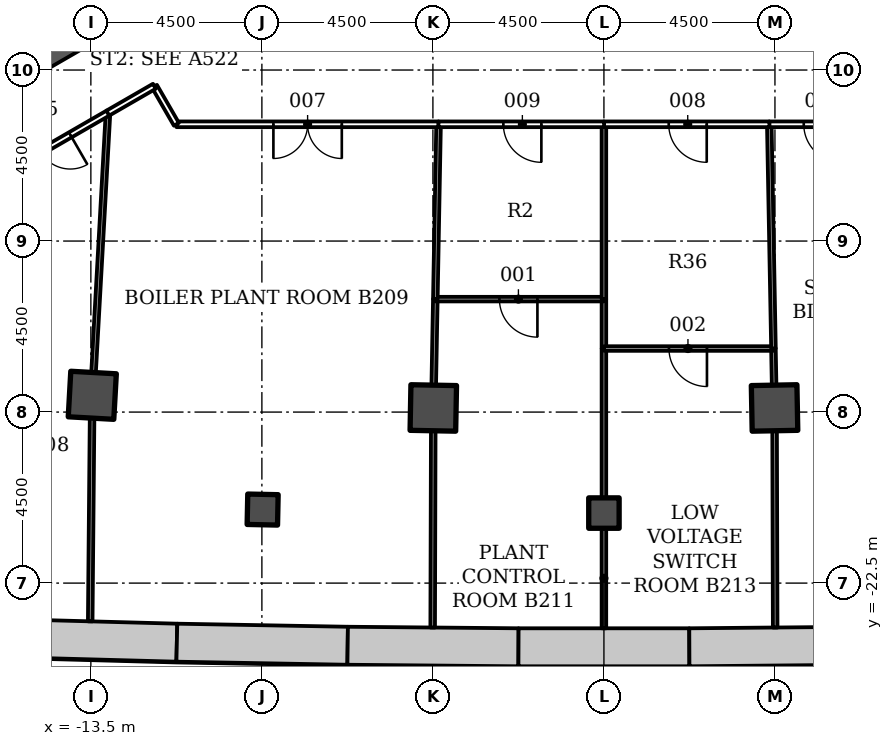
"""IFC4 building model, lengths in metres.
Left out: names, types, materials, properties, quantities, classifications, styles, units other than length and angle.
Written with IfcOpenShell. Run it as: python <this file> out.ifc"""

import sys

from ifc_helpers import new_model, si_unit, direction, frame, frame_2d, origin, origin_2d, place, context, subcontext, project, spatial, polyline, rectangle, outline, extrude, element, fill, save


model = new_model("IFC4")
c1 = context("Model", 3, precision=1e-05, world=origin(), true_north=direction((0.0, 1.0)))
c2 = subcontext(c1, "Body", "Model", "MODEL_VIEW")
j1 = project(units=[si_unit("LENGTHUNIT", "METRE"), si_unit("PLANEANGLEUNIT", "RADIAN")], contexts=[c1])
p1 = place(None, origin())
s1 = spatial("IfcSite", under=j1, at=p1, CompositionType="ELEMENT")
p2 = place(p1, origin())
s2 = spatial("IfcBuilding", under=s1, at=p2, CompositionType="ELEMENT")
p3 = place(p2, frame((0.0, 0.0, -9.0)))
s3 = spatial("IfcBuildingStorey", under=s2, at=p3, CompositionType="ELEMENT", Elevation=-9.0)
p4 = place(p3, origin())
e1 = element("IfcWall", 1, at=p4, inside=s3, PredefinedType="SOLIDWALL", context=c2, shape_type="SweptSolid", body=[
    extrude(outline(polyline([(-15.747, -24.446), (-11.249, -24.568), (-11.227, -23.568), (-15.716, -23.447), (-15.747, -24.446)])), origin(), (0.0, 0.0, 1.0), 4.2),
])
p5 = place(p3, origin())
e2 = element("IfcWall", 2, at=p5, inside=s3, PredefinedType="SOLIDWALL", context=c2, shape_type="SweptSolid", body=[
    extrude(outline(polyline([(-11.249, -24.568), (-6.75, -24.648), (-6.736, -23.649), (-11.227, -23.568), (-11.249, -24.568)])), origin(), (0.0, 0.0, 1.0), 4.2),
])
p6 = place(p3, origin())
e3 = element("IfcWall", 3, at=p6, inside=s3, PredefinedType="SOLIDWALL", context=c2, shape_type="SweptSolid", body=[
    extrude(outline(polyline([(-6.75, -24.648), (-2.25, -24.689), (-2.246, -23.689), (-6.736, -23.649), (-6.75, -24.648)])), origin(), (0.0, 0.0, 1.0), 4.2),
])
p7 = place(p3, origin())
e4 = element("IfcWall", 4, at=p7, inside=s3, PredefinedType="SOLIDWALL", context=c2, shape_type="SweptSolid", body=[
    extrude(outline(polyline([(-2.25, -24.689), (2.25, -24.689), (2.246, -23.689), (-2.246, -23.689), (-2.25, -24.689)])), origin(), (0.0, 0.0, 1.0), 4.2),
])
p8 = place(p3, origin())
e5 = element("IfcWall", 5, at=p8, inside=s3, PredefinedType="SOLIDWALL", context=c2, shape_type="SweptSolid", body=[
    extrude(outline(polyline([(2.25, -24.689), (6.75, -24.648), (6.736, -23.649), (2.246, -23.689), (2.25, -24.689)])), origin(), (0.0, 0.0, 1.0), 4.2),
])
for number, where, z_axis, x_axis in (
    (6, (-13.462, -17.558, -0.3), (0.0, 0.0, 1.0), (-0.056, -0.998, 0.0)),
    (7, (-4.49, -17.892, -0.3), (0.0, 0.0, 1.0), (-0.019, -1.0, 0.0)),
    (8, (4.49, -17.892, -0.3), (0.0, 0.0, 1.0), (0.019, -1.0, 0.0)),
):
    element("IfcColumn", number, at=place(p3, frame(where, z_axis=z_axis, x_axis=x_axis)), inside=s3, PredefinedType="COLUMN", context=c2, shape_type="SweptSolid", body=[
        extrude(rectangle(XDim=1.2, YDim=1.2, at=origin_2d()), origin(), (0.0, 0.0, 1.0), 4.5),
    ])
for number, where, z_axis, x_axis in (
    (9, (-8.98, -20.565, -0.3), (0.0, 0.0, 1.0), (-0.021, -1.0, 0.0)),
    (10, (0.0, -20.657, -0.3), (0.0, 0.0, 1.0), (0.0, -1.0, 0.0)),
):
    element("IfcColumn", number, at=place(p3, frame(where, z_axis=z_axis, x_axis=x_axis)), inside=s3, PredefinedType="COLUMN", context=c2, shape_type="SweptSolid", body=[
        extrude(rectangle(XDim=0.8, YDim=0.8, at=origin_2d()), origin(), (0.0, 0.0, 1.0), 4.5),
    ])
p9 = place(p3, frame((-9.922, -5.728, -0.3), z_axis=(0.0, 0.0, 1.0), x_axis=(-0.866028046028, -0.499995423472, 0.0)))
e11 = element("IfcWall", 11, at=p9, inside=s3, PredefinedType="SHEAR", context=c2, shape_type="SweptSolid", body=[
    extrude(rectangle(XDim=14.633, YDim=0.9, at=frame_2d((7.316, 0.0))), origin(), (0.0, 0.0, 1.0), 4.5),
])
p10 = place(p9, frame((7.35, 0.0, 0.3)))
e12 = element("IfcOpeningElement", 12, at=p10, cuts=e11, PredefinedType="OPENING", context=c2, shape_type="SweptSolid", body=[
    extrude(rectangle(XDim=1.5, YDim=2.1, at=frame_2d((0.75, 1.05))), frame((0.0, 0.46, 0.0), z_axis=(0.0, -1.0, 0.0), x_axis=(1.0, 0.0, 0.0)), (0.0, 0.0, 1.0), 0.92),
])
p11 = place(p3, frame((-10.43, -4.847, -0.3), z_axis=(0.0, 0.0, 1.0), x_axis=(-0.866018442252, -0.500012057535, 0.0)))
e13 = element("IfcWall", 13, at=p11, inside=s3, PredefinedType="SHEAR", context=c2, shape_type="SweptSolid", body=[
    extrude(rectangle(XDim=7.2, YDim=1.136, at=frame_2d((3.6, 0.0))), origin(), (0.0, 0.0, 1.0), 4.5),
])
p12 = place(p3, frame((0.0, -23.689, 0.0), z_axis=(0.0, 0.0, 1.0), x_axis=(0.0, 1.0, 0.0)))
e14 = element("IfcWall", 14, at=p12, inside=s3, PredefinedType="PARTITIONING", context=c2, shape_type="SweptSolid", body=[
    extrude(rectangle(XDim=2.632, YDim=0.12, at=frame_2d((1.316, 0.0))), origin(), (0.0, 0.0, 1.0), 4.2),
])
p13 = place(p3, frame((0.0, -20.257, 0.0), z_axis=(0.0, 0.0, 1.0), x_axis=(0.0, 1.0, 0.0)))
e15 = element("IfcWall", 15, at=p13, inside=s3, PredefinedType="PARTITIONING", context=c2, shape_type="SweptSolid", body=[
    extrude(rectangle(XDim=3.929, YDim=0.12, at=frame_2d((1.965, 0.0))), origin(), (0.0, 0.0, 1.0), 3.588),
])
p14 = place(p3, frame((-4.491, -18.492, 0.0), z_axis=(0.0, 0.0, 1.0), x_axis=(-0.00292382622, -0.999995725611, 0.0)))
e16 = element("IfcWall", 16, at=p14, inside=s3, PredefinedType="PARTITIONING", context=c2, shape_type="SweptSolid", body=[
    extrude(rectangle(XDim=5.177, YDim=0.12, at=frame_2d((2.588, 0.0))), origin(), (0.0, 0.0, 1.0), 3.583),
])
p15 = place(p3, frame((-4.436, -15.024, 0.0), z_axis=(0.0, 0.0, 1.0), x_axis=(-0.018519330436, -0.999828502494, 0.0)))
e17 = element("IfcWall", 17, at=p15, inside=s3, PredefinedType="PARTITIONING", context=c2, shape_type="SweptSolid", body=[
    extrude(rectangle(XDim=2.268, YDim=0.12, at=frame_2d((1.134, 0.0))), origin(), (0.0, 0.0, 1.0), 3.588),
])
p16 = place(p3, frame((0.0, -16.328, 0.0), z_axis=(0.0, 0.0, 1.0), x_axis=(0.0, 1.0, 0.0)))
e18 = element("IfcWall", 18, at=p16, inside=s3, PredefinedType="PARTITIONING", context=c2, shape_type="SweptSolid", body=[
    extrude(rectangle(XDim=1.304, YDim=0.12, at=frame_2d((0.652, 0.0))), origin(), (0.0, 0.0, 1.0), 3.588),
])
p17 = place(p3, frame((0.0, -15.028, 0.0), z_axis=(0.0, 0.0, 1.0), x_axis=(-1.0, 0.0, 0.0)))
e19 = element("IfcWall", 19, at=p17, inside=s3, PredefinedType="PARTITIONING", context=c2, shape_type="SweptSolid", body=[
    extrude(rectangle(XDim=4.436, YDim=0.12, at=frame_2d((2.218, 0.0))), origin(), (0.0, 0.0, 1.0), 3.588),
])
p18 = place(p17, frame((1.75, 0.0, 0.0)))
e20 = element("IfcOpeningElement", 20, at=p18, cuts=e19, PredefinedType="OPENING", context=c2, shape_type="SweptSolid", body=[
    extrude(rectangle(XDim=1.0, YDim=2.1, at=frame_2d((0.5, 1.05))), frame((0.0, 0.07, 0.0), z_axis=(0.0, -1.0, 0.0), x_axis=(1.0, 0.0, 0.0)), (0.0, 0.0, 1.0), 0.14),
])
p19 = place(p3, frame((4.478, -17.291, 0.0), z_axis=(0.0, 0.0, 1.0), x_axis=(-0.018678891577, 0.999825534286, 0.0)))
e21 = element("IfcWall", 21, at=p19, inside=s3, PredefinedType="PARTITIONING", context=c2, shape_type="SweptSolid", body=[
    extrude(rectangle(XDim=0.967, YDim=0.12, at=frame_2d((0.484, 0.0))), origin(), (0.0, 0.0, 1.0), 3.588),
])
p20 = place(p3, frame((4.506, -23.669, 0.0), z_axis=(0.0, 0.0, 1.0), x_axis=(-0.00292382622, 0.999995725611, 0.0)))
e22 = element("IfcWall", 22, at=p20, inside=s3, PredefinedType="PARTITIONING", context=c2, shape_type="SweptSolid", body=[
    extrude(rectangle(XDim=5.177, YDim=0.12, at=frame_2d((2.588, 0.0))), origin(), (0.0, 0.0, 1.0), 3.583),
])
p21 = place(p3, frame((4.461, -16.328, 0.0), z_axis=(0.0, 0.0, 1.0), x_axis=(-1.0, 0.0, 0.0)))
e23 = element("IfcWall", 23, at=p21, inside=s3, PredefinedType="PARTITIONING", context=c2, shape_type="SweptSolid", body=[
    extrude(rectangle(XDim=4.461, YDim=0.12, at=frame_2d((2.23, 0.0))), origin(), (0.0, 0.0, 1.0), 3.588),
])
p22 = place(p21, frame((1.75, 0.0, 0.0)))
e24 = element("IfcOpeningElement", 24, at=p22, cuts=e23, PredefinedType="OPENING", context=c2, shape_type="SweptSolid", body=[
    extrude(rectangle(XDim=1.0, YDim=2.1, at=frame_2d((0.5, 1.05))), frame((0.0, 0.07, 0.0), z_axis=(0.0, -1.0, 0.0), x_axis=(1.0, 0.0, 0.0)), (0.0, 0.0, 1.0), 0.14),
])
p23 = place(p3, frame((-13.517, -23.506, 0.0), z_axis=(0.0, 0.0, 1.0), x_axis=(0.00917685765, 0.999957891755, 0.0)))
e25 = element("IfcWall", 25, at=p23, inside=s3, PredefinedType="PARTITIONING", context=c2, shape_type="SweptSolid", body=[
    extrude(rectangle(XDim=5.347, YDim=0.12, at=frame_2d((2.674, 0.0))), origin(), (0.0, 0.0, 1.0), 3.583),
])
p24 = place(p3, frame((-13.429, -16.96, 0.0), z_axis=(0.0, 0.0, 1.0), x_axis=(0.055551088657, 0.998455846069, 0.0)))
e26 = element("IfcWall", 26, at=p24, inside=s3, PredefinedType="PARTITIONING", context=c2, shape_type="SweptSolid", body=[
    extrude(rectangle(XDim=6.838, YDim=0.12, at=frame_2d((3.419, 0.0))), origin(), (0.0, 0.0, 1.0), 3.588),
])
p25 = place(p3, frame((-13.045, -10.13, 0.0), z_axis=(0.0, 0.0, 1.0), x_axis=(-0.866035577775, -0.499982377718, 0.0)))
e27 = element("IfcWall", 27, at=p25, inside=s3, PredefinedType="PARTITIONING", context=c2, shape_type="SweptSolid", body=[
    extrude(rectangle(XDim=4.093, YDim=0.15, at=frame_2d((2.046, 0.0))), origin(), (0.0, 0.0, 1.0), 3.588),
])
p26 = place(p25, frame((1.15, 0.0, 0.0)))
e28 = element("IfcOpeningElement", 28, at=p26, cuts=e27, PredefinedType="OPENING", context=c2, shape_type="SweptSolid", body=[
    extrude(rectangle(XDim=1.8, YDim=2.1, at=frame_2d((0.9, 1.05))), frame((0.0, 0.085, 0.0), z_axis=(0.0, -1.0, 0.0), x_axis=(1.0, 0.0, 0.0)), (0.0, 0.0, 1.0), 0.17),
])
p27 = place(p3, frame((4.351, -10.429, 0.0), z_axis=(0.0, 0.0, 1.0), x_axis=(0.018624139004, -0.999826555682, 0.0)))
e29 = element("IfcWall", 29, at=p27, inside=s3, PredefinedType="PARTITIONING", context=c2, shape_type="SweptSolid", body=[
    extrude(rectangle(XDim=5.899, YDim=0.12, at=frame_2d((2.949, 0.0))), origin(), (0.0, 0.0, 1.0), 3.588),
])
p28 = place(p3, frame((7.208, -10.428, 0.0), z_axis=(0.0, 0.0, 1.0), x_axis=(-1.0, 0.0, 0.0)))
e30 = element("IfcWall", 30, at=p28, inside=s3, PredefinedType="PARTITIONING", context=c2, shape_type="SweptSolid", body=[
    extrude(rectangle(XDim=2.861, YDim=0.15, at=frame_2d((1.431, 0.0))), origin(), (0.0, 0.0, 1.0), 3.588),
])
p29 = place(p28, frame((0.95, 0.0, 0.0)))
e31 = element("IfcOpeningElement", 31, at=p29, cuts=e30, PredefinedType="OPENING", context=c2, shape_type="SweptSolid", body=[
    extrude(rectangle(XDim=1.0, YDim=2.1, at=frame_2d((0.5, 1.05))), frame((0.0, 0.085, 0.0), z_axis=(0.0, -1.0, 0.0), x_axis=(1.0, 0.0, 0.0)), (0.0, 0.0, 1.0), 0.17),
])
p30 = place(p3, frame((-4.436, -15.027, 0.0), z_axis=(0.0, 0.0, 1.0), x_axis=(0.018474068719, 0.99982933983, 0.0)))
e32 = element("IfcWall", 32, at=p30, inside=s3, PredefinedType="PARTITIONING", context=c2, shape_type="SweptSolid", body=[
    extrude(rectangle(XDim=4.599, YDim=0.12, at=frame_2d((2.299, 0.0))), origin(), (0.0, 0.0, 1.0), 3.588),
])
p31 = place(p3, frame((-4.347, -10.428, 0.0), z_axis=(0.0, 0.0, 1.0), x_axis=(-1.0, 0.0, 0.0)))
e33 = element("IfcWall", 33, at=p31, inside=s3, PredefinedType="PARTITIONING", context=c2, shape_type="SweptSolid", body=[
    extrude(rectangle(XDim=6.902, YDim=0.15, at=frame_2d((3.451, 0.0))), origin(), (0.0, 0.0, 1.0), 3.588),
])
p32 = place(p31, frame((2.55, 0.0, 0.0)))
e34 = element("IfcOpeningElement", 34, at=p32, cuts=e33, PredefinedType="OPENING", context=c2, shape_type="SweptSolid", body=[
    extrude(rectangle(XDim=1.8, YDim=2.1, at=frame_2d((0.9, 1.05))), frame((0.0, 0.085, 0.0), z_axis=(0.0, -1.0, 0.0), x_axis=(1.0, 0.0, 0.0)), (0.0, 0.0, 1.0), 0.17),
])
p33 = place(p3, frame((-11.249, -10.428, 0.0), z_axis=(0.0, 0.0, 1.0), x_axis=(-0.499978438088, 0.866037852202, 0.0)))
e35 = element("IfcWall", 35, at=p33, inside=s3, PredefinedType="PARTITIONING", context=c2, shape_type="SweptSolid", body=[
    extrude(rectangle(XDim=1.156, YDim=0.15, at=frame_2d((0.578, 0.0))), origin(), (0.0, 0.0, 1.0), 4.2),
])
p34 = place(p3, frame((-11.828, -9.427, 0.0), z_axis=(0.0, 0.0, 1.0), x_axis=(-0.866110865696, -0.499851946404, 0.0)))
e36 = element("IfcWall", 36, at=p34, inside=s3, PredefinedType="PARTITIONING", context=c2, shape_type="SweptSolid", body=[
    extrude(rectangle(XDim=1.415, YDim=0.15, at=frame_2d((0.707, 0.0))), origin(), (0.0, 0.0, 1.0), 3.588),
])
p35 = place(p3, frame((0.0, -10.428, 0.0), z_axis=(0.0, 0.0, 1.0), x_axis=(0.0, -1.0, 0.0)))
e37 = element("IfcWall", 37, at=p35, inside=s3, PredefinedType="PARTITIONING", context=c2, shape_type="SweptSolid", body=[
    extrude(rectangle(XDim=4.6, YDim=0.12, at=frame_2d((2.3, 0.0))), origin(), (0.0, 0.0, 1.0), 3.588),
])
p36 = place(p3, frame((4.355, -10.428, 0.0), z_axis=(0.0, 0.0, 1.0), x_axis=(-1.0, 0.0, 0.0)))
e38 = element("IfcWall", 38, at=p36, inside=s3, PredefinedType="PARTITIONING", context=c2, shape_type="SweptSolid", body=[
    extrude(rectangle(XDim=4.359, YDim=0.15, at=frame_2d((2.179, 0.0))), origin(), (0.0, 0.0, 1.0), 3.588),
])
p37 = place(p36, frame((1.65, 0.0, 0.0)))
e39 = element("IfcOpeningElement", 39, at=p37, cuts=e38, PredefinedType="OPENING", context=c2, shape_type="SweptSolid", body=[
    extrude(rectangle(XDim=1.0, YDim=2.1, at=frame_2d((0.5, 1.05))), frame((0.0, 0.085, 0.0), z_axis=(0.0, -1.0, 0.0), x_axis=(1.0, 0.0, 0.0)), (0.0, 0.0, 1.0), 0.17),
])
p38 = place(p3, frame((0.004, -10.428, 0.0), z_axis=(0.0, 0.0, 1.0), x_axis=(-1.0, 0.0, 0.0)))
e40 = element("IfcWall", 40, at=p38, inside=s3, PredefinedType="PARTITIONING", context=c2, shape_type="SweptSolid", body=[
    extrude(rectangle(XDim=4.359, YDim=0.15, at=frame_2d((2.179, 0.0))), origin(), (0.0, 0.0, 1.0), 3.588),
])
p39 = place(p38, frame((1.65, 0.0, 0.0)))
e41 = element("IfcOpeningElement", 41, at=p39, cuts=e40, PredefinedType="OPENING", context=c2, shape_type="SweptSolid", body=[
    extrude(rectangle(XDim=1.0, YDim=2.1, at=frame_2d((0.5, 1.05))), frame((0.0, 0.085, 0.0), z_axis=(0.0, -1.0, 0.0), x_axis=(1.0, 0.0, 0.0)), (0.0, 0.0, 1.0), 0.17),
])
p40 = place(p18, origin())
e42 = element("IfcDoor", 42, at=p40, inside=s3, OperationType="SINGLE_SWING_RIGHT", PredefinedType="DOOR", context=c2, shape_type="SweptSolid", body=[
    extrude(rectangle(XDim=1.0, YDim=2.1, at=frame_2d((0.5, 1.05))), frame((0.0, 0.025, 0.0), z_axis=(0.0, -1.0, 0.0), x_axis=(1.0, 0.0, 0.0)), (0.0, 0.0, 1.0), 0.05),
])
fill(e20, e42)
p41 = place(p22, origin())
e43 = element("IfcDoor", 43, at=p41, inside=s3, OperationType="SINGLE_SWING_RIGHT", PredefinedType="DOOR", context=c2, shape_type="SweptSolid", body=[
    extrude(rectangle(XDim=1.0, YDim=2.1, at=frame_2d((0.5, 1.05))), frame((0.0, 0.025, 0.0), z_axis=(0.0, -1.0, 0.0), x_axis=(1.0, 0.0, 0.0)), (0.0, 0.0, 1.0), 0.05),
])
fill(e24, e43)
p42 = place(p26, origin())
e44 = element("IfcDoor", 44, at=p42, inside=s3, OperationType="DOUBLE_DOOR_SINGLE_SWING", PredefinedType="DOOR", context=c2, shape_type="SweptSolid", body=[
    extrude(rectangle(XDim=1.8, YDim=2.1, at=frame_2d((0.9, 1.05))), frame((0.0, 0.025, 0.0), z_axis=(0.0, -1.0, 0.0), x_axis=(1.0, 0.0, 0.0)), (0.0, 0.0, 1.0), 0.05),
])
fill(e28, e44)
p43 = place(p29, origin())
e45 = element("IfcDoor", 45, at=p43, inside=s3, OperationType="SINGLE_SWING_RIGHT", PredefinedType="DOOR", context=c2, shape_type="SweptSolid", body=[
    extrude(rectangle(XDim=1.0, YDim=2.1, at=frame_2d((0.5, 1.05))), frame((0.0, 0.025, 0.0), z_axis=(0.0, -1.0, 0.0), x_axis=(1.0, 0.0, 0.0)), (0.0, 0.0, 1.0), 0.05),
])
fill(e31, e45)
p44 = place(p32, origin())
e46 = element("IfcDoor", 46, at=p44, inside=s3, OperationType="DOUBLE_DOOR_SINGLE_SWING", PredefinedType="DOOR", context=c2, shape_type="SweptSolid", body=[
    extrude(rectangle(XDim=1.8, YDim=2.1, at=frame_2d((0.9, 1.05))), frame((0.0, 0.025, 0.0), z_axis=(0.0, -1.0, 0.0), x_axis=(1.0, 0.0, 0.0)), (0.0, 0.0, 1.0), 0.05),
])
fill(e34, e46)
p45 = place(p37, origin())
e47 = element("IfcDoor", 47, at=p45, inside=s3, OperationType="SINGLE_SWING_LEFT", PredefinedType="DOOR", context=c2, shape_type="SweptSolid", body=[
    extrude(rectangle(XDim=1.0, YDim=2.1, at=frame_2d((0.5, 1.05))), frame((0.0, 0.025, 0.0), z_axis=(0.0, -1.0, 0.0), x_axis=(1.0, 0.0, 0.0)), (0.0, 0.0, 1.0), 0.05),
])
fill(e39, e47)
p46 = place(p39, origin())
e48 = element("IfcDoor", 48, at=p46, inside=s3, OperationType="SINGLE_SWING_LEFT", PredefinedType="DOOR", context=c2, shape_type="SweptSolid", body=[
    extrude(rectangle(XDim=1.0, YDim=2.1, at=frame_2d((0.5, 1.05))), frame((0.0, 0.025, 0.0), z_axis=(0.0, -1.0, 0.0), x_axis=(1.0, 0.0, 0.0)), (0.0, 0.0, 1.0), 0.05),
])
fill(e41, e48)
save(model, sys.argv[1])
